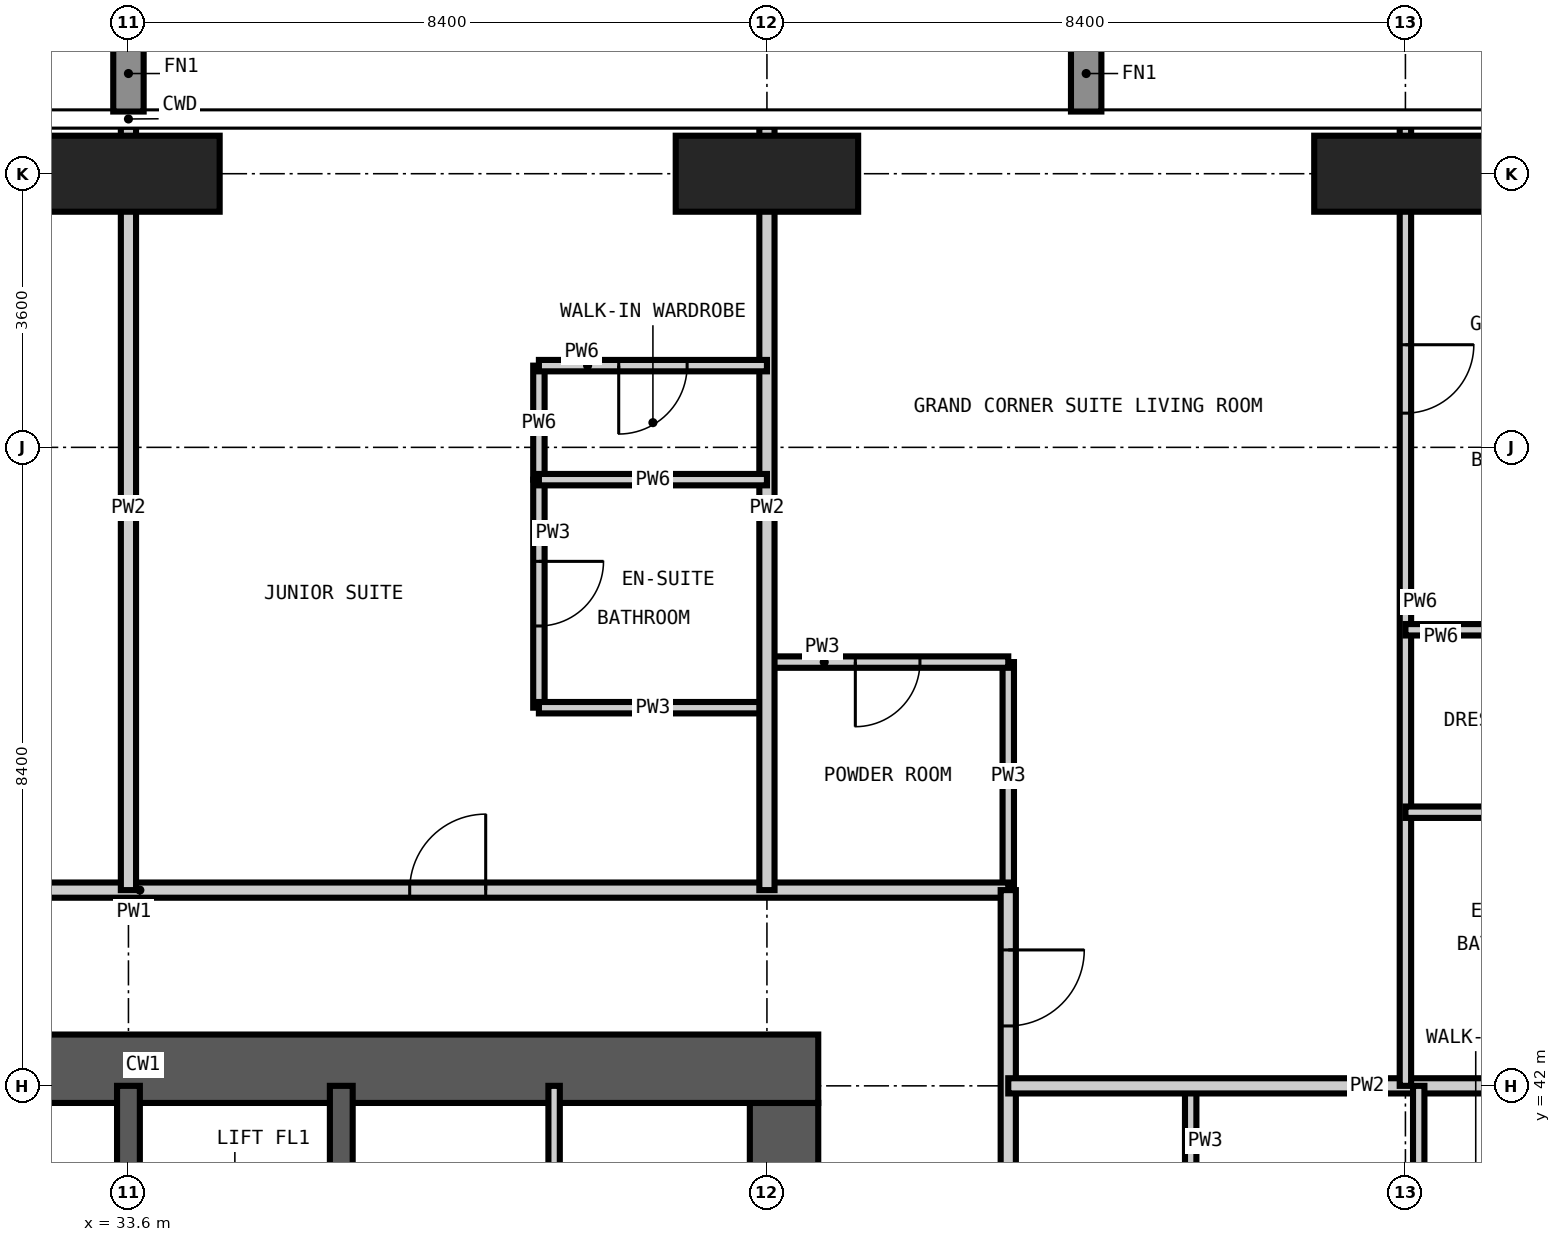
"""IFC4 building model, lengths in metres.
Left out: names, types, materials, properties, quantities, classifications, styles, units other than length and angle.
Written with IfcOpenShell. Run it as: python <this file> out.ifc"""

import sys

from ifc_helpers import new_model, si_unit, direction, frame, frame_2d, origin, origin_2d, place, context, subcontext, project, spatial, rectangle, extrude, element, fill, save


model = new_model("IFC4")
c1 = context("Model", 3, precision=1e-05, world=origin(), true_north=direction((0.0, 1.0)))
c2 = subcontext(c1, "Body", "Model", "MODEL_VIEW")
j1 = project(units=[si_unit("LENGTHUNIT", "METRE"), si_unit("PLANEANGLEUNIT", "RADIAN")], contexts=[c1])
p1 = place(None, origin())
s1 = spatial("IfcSite", under=j1, at=p1, CompositionType="ELEMENT")
p2 = place(p1, origin())
s2 = spatial("IfcBuilding", under=s1, at=p2, CompositionType="ELEMENT")
p3 = place(p2, frame((0.0, 0.0, 237.3)))
s3 = spatial("IfcBuildingStorey", under=s2, at=p3, CompositionType="ELEMENT", Elevation=237.3)
for number, where, z_axis, x_axis in (
    (1, (33.6, 54.0, -0.35), (0.0, 0.0, 1.0), (1.0, 0.0, 0.0)),
    (2, (42.0, 54.0, -0.35), (0.0, 0.0, 1.0), (1.0, 0.0, 0.0)),
    (3, (50.4, 54.0, -0.35), (0.0, 0.0, 1.0), (1.0, 0.0, 0.0)),
):
    element("IfcColumn", number, at=place(p3, frame(where, z_axis=z_axis, x_axis=x_axis)), inside=s3, PredefinedType="COLUMN", context=c2, shape_type="SweptSolid", body=[
        extrude(rectangle(XDim=2.4, YDim=1.0, at=origin_2d()), origin(), (0.0, 0.0, 1.0), 3.9),
    ])
p4 = place(p3, frame((42.225, 17.025, -0.35), z_axis=(0.0, 0.0, 1.0), x_axis=(0.0, 1.0, 0.0)))
e4 = element("IfcWall", 4, at=p4, inside=s3, PredefinedType="SHEAR", context=c2, shape_type="SweptSolid", body=[
    extrude(rectangle(XDim=24.75, YDim=0.9, at=frame_2d((12.375, 0.0))), origin(), (0.0, 0.0, 1.0), 3.9),
])
p5 = place(p4, frame((0.575, 0.0, 0.35)))
e5 = element("IfcOpeningElement", 5, at=p5, cuts=e4, PredefinedType="OPENING", context=c2, shape_type="SweptSolid", body=[
    extrude(rectangle(XDim=1.2, YDim=2.2, at=frame_2d((0.6, 1.1))), frame((0.0, 0.46, 0.0), z_axis=(0.0, -1.0, 0.0), x_axis=(1.0, 0.0, 0.0)), (0.0, 0.0, 1.0), 0.92),
])
p6 = place(p4, frame((11.475, 0.0, 0.35)))
e6 = element("IfcOpeningElement", 6, at=p6, cuts=e4, PredefinedType="OPENING", context=c2, shape_type="SweptSolid", body=[
    extrude(rectangle(XDim=1.8, YDim=2.2, at=frame_2d((0.9, 1.1))), frame((0.0, 0.46, 0.0), z_axis=(0.0, -1.0, 0.0), x_axis=(1.0, 0.0, 0.0)), (0.0, 0.0, 1.0), 0.92),
])
p7 = place(p4, frame((20.275, 0.0, 0.35)))
e7 = element("IfcOpeningElement", 7, at=p7, cuts=e4, PredefinedType="OPENING", context=c2, shape_type="SweptSolid", body=[
    extrude(rectangle(XDim=1.0, YDim=2.1, at=frame_2d((0.5, 1.05))), frame((0.0, 0.46, 0.0), z_axis=(0.0, -1.0, 0.0), x_axis=(1.0, 0.0, 0.0)), (0.0, 0.0, 1.0), 0.92),
])
p8 = place(p3, frame((42.675, 42.225, -0.35), z_axis=(0.0, 0.0, 1.0), x_axis=(-1.0, 0.0, 0.0)))
e8 = element("IfcWall", 8, at=p8, inside=s3, PredefinedType="SHEAR", context=c2, shape_type="SweptSolid", body=[
    extrude(rectangle(XDim=18.15, YDim=0.9, at=frame_2d((9.075, 0.0))), origin(), (0.0, 0.0, 1.0), 3.9),
])
p9 = place(p8, frame((10.575, 0.0, 0.35)))
e9 = element("IfcOpeningElement", 9, at=p9, cuts=e8, PredefinedType="OPENING", context=c2, shape_type="SweptSolid", body=[
    extrude(rectangle(XDim=1.2, YDim=2.2, at=frame_2d((0.6, 1.1))), frame((0.0, 0.46, 0.0), z_axis=(0.0, -1.0, 0.0), x_axis=(1.0, 0.0, 0.0)), (0.0, 0.0, 1.0), 0.92),
])
p10 = place(p3, frame((33.6, 16.8, -0.35), z_axis=(0.0, 0.0, 1.0), x_axis=(0.0, 1.0, 0.0)))
e10 = element("IfcWall", 10, at=p10, inside=s3, PredefinedType="SHEAR", context=c2, shape_type="SweptSolid", body=[
    extrude(rectangle(XDim=25.2, YDim=0.3, at=frame_2d((12.6, 0.0))), origin(), (0.0, 0.0, 1.0), 3.9),
])
p11 = place(p10, frame((22.5, 0.0, 0.35)))
e11 = element("IfcOpeningElement", 11, at=p11, cuts=e10, PredefinedType="OPENING", context=c2, shape_type="SweptSolid", body=[
    extrude(rectangle(XDim=1.2, YDim=2.2, at=frame_2d((0.6, 1.1))), frame((0.0, 0.16, 0.0), z_axis=(0.0, -1.0, 0.0), x_axis=(1.0, 0.0, 0.0)), (0.0, 0.0, 1.0), 0.32),
])
p12 = place(p10, frame((18.3, 0.0, 0.35)))
e12 = element("IfcOpeningElement", 12, at=p12, cuts=e10, PredefinedType="OPENING", context=c2, shape_type="SweptSolid", body=[
    extrude(rectangle(XDim=1.2, YDim=2.2, at=frame_2d((0.6, 1.1))), frame((0.0, 0.16, 0.0), z_axis=(0.0, -1.0, 0.0), x_axis=(1.0, 0.0, 0.0)), (0.0, 0.0, 1.0), 0.32),
])
p13 = place(p10, frame((9.3, 0.0, 0.35)))
e13 = element("IfcOpeningElement", 13, at=p13, cuts=e10, PredefinedType="OPENING", context=c2, shape_type="SweptSolid", body=[
    extrude(rectangle(XDim=1.0, YDim=2.1, at=frame_2d((0.5, 1.05))), frame((0.0, 0.16, 0.0), z_axis=(0.0, -1.0, 0.0), x_axis=(1.0, 0.0, 0.0)), (0.0, 0.0, 1.0), 0.32),
])
p14 = place(p3, frame((36.4, 33.6, -0.35), z_axis=(0.0, 0.0, 1.0), x_axis=(0.0, 1.0, 0.0)))
e14 = element("IfcWall", 14, at=p14, inside=s3, PredefinedType="SHEAR", context=c2, shape_type="SweptSolid", body=[
    extrude(rectangle(XDim=8.4, YDim=0.3, at=frame_2d((4.2, 0.0))), origin(), (0.0, 0.0, 1.0), 3.9),
])
p15 = place(p3, frame((39.0, 46.975, 0.0), z_axis=(0.0, 0.0, 1.0), x_axis=(0.0, 1.0, 0.0)))
e15 = element("IfcWall", 15, at=p15, inside=s3, PredefinedType="PARTITIONING", context=c2, shape_type="SweptSolid", body=[
    extrude(rectangle(XDim=3.0, YDim=0.15, at=frame_2d((1.5, 0.0))), origin(), (0.0, 0.0, 1.0), 3.55),
])
p16 = place(p15, frame((1.075, 0.0, 0.0)))
e16 = element("IfcOpeningElement", 16, at=p16, cuts=e15, PredefinedType="OPENING", context=c2, shape_type="SweptSolid", body=[
    extrude(rectangle(XDim=0.85, YDim=2.1, at=frame_2d((0.425, 1.05))), frame((0.0, 0.085, 0.0), z_axis=(0.0, -1.0, 0.0), x_axis=(1.0, 0.0, 0.0)), (0.0, 0.0, 1.0), 0.17),
])
p17 = place(p3, frame((45.175, 44.575, 0.0), z_axis=(0.0, 0.0, 1.0), x_axis=(0.0, 1.0, 0.0)))
e17 = element("IfcWall", 17, at=p17, inside=s3, PredefinedType="PARTITIONING", context=c2, shape_type="SweptSolid", body=[
    extrude(rectangle(XDim=3.0, YDim=0.15, at=frame_2d((1.5, 0.0))), origin(), (0.0, 0.0, 1.0), 3.55),
])
p18 = place(p3, frame((47.575, 39.0, 0.0), z_axis=(0.0, 0.0, 1.0), x_axis=(0.0, 1.0, 0.0)))
e18 = element("IfcWall", 18, at=p18, inside=s3, PredefinedType="PARTITIONING", context=c2, shape_type="SweptSolid", body=[
    extrude(rectangle(XDim=3.0, YDim=0.15, at=frame_2d((1.5, 0.0))), origin(), (0.0, 0.0, 1.0), 3.55),
])
p19 = place(p18, frame((1.075, 0.0, 0.0)))
e19 = element("IfcOpeningElement", 19, at=p19, cuts=e18, PredefinedType="OPENING", context=c2, shape_type="SweptSolid", body=[
    extrude(rectangle(XDim=0.85, YDim=2.1, at=frame_2d((0.425, 1.05))), frame((0.0, 0.085, 0.0), z_axis=(0.0, -1.0, 0.0), x_axis=(1.0, 0.0, 0.0)), (0.0, 0.0, 1.0), 0.17),
])
p20 = place(p3, frame((39.0, 46.975, 0.0), z_axis=(0.0, 0.0, 1.0), x_axis=(1.0, 0.0, 0.0)))
e20 = element("IfcWall", 20, at=p20, inside=s3, PredefinedType="PARTITIONING", context=c2, shape_type="SweptSolid", body=[
    extrude(rectangle(XDim=3.0, YDim=0.15, at=frame_2d((1.5, 0.0))), origin(), (0.0, 0.0, 1.0), 3.55),
])
p21 = place(p3, frame((42.0, 47.575, 0.0), z_axis=(0.0, 0.0, 1.0), x_axis=(1.0, 0.0, 0.0)))
e21 = element("IfcWall", 21, at=p21, inside=s3, PredefinedType="PARTITIONING", context=c2, shape_type="SweptSolid", body=[
    extrude(rectangle(XDim=3.175, YDim=0.15, at=frame_2d((1.587, 0.0))), origin(), (0.0, 0.0, 1.0), 3.55),
])
p22 = place(p21, frame((1.163, 0.0, 0.0)))
e22 = element("IfcOpeningElement", 22, at=p22, cuts=e21, PredefinedType="OPENING", context=c2, shape_type="SweptSolid", body=[
    extrude(rectangle(XDim=0.85, YDim=2.1, at=frame_2d((0.425, 1.05))), frame((0.0, 0.085, 0.0), z_axis=(0.0, -1.0, 0.0), x_axis=(1.0, 0.0, 0.0)), (0.0, 0.0, 1.0), 0.17),
])
p23 = place(p3, frame((22.325, 44.575, 0.0), z_axis=(0.0, 0.0, 1.0), x_axis=(1.0, 0.0, 0.0)))
e23 = element("IfcWall", 23, at=p23, inside=s3, PredefinedType="PARTITIONING", context=c2, shape_type="SweptSolid", body=[
    extrude(rectangle(XDim=22.85, YDim=0.2, at=frame_2d((11.425, 0.0))), origin(), (0.0, 0.0, 1.0), 3.55),
])
p24 = place(p23, frame((6.575, 0.0, 0.0)))
e24 = element("IfcOpeningElement", 24, at=p24, cuts=e23, PredefinedType="OPENING", context=c2, shape_type="SweptSolid", body=[
    extrude(rectangle(XDim=1.0, YDim=2.2, at=frame_2d((0.5, 1.1))), frame((0.0, 0.11, 0.0), z_axis=(0.0, -1.0, 0.0), x_axis=(1.0, 0.0, 0.0)), (0.0, 0.0, 1.0), 0.22),
])
p25 = place(p23, frame((14.975, 0.0, 0.0)))
e25 = element("IfcOpeningElement", 25, at=p25, cuts=e23, PredefinedType="OPENING", context=c2, shape_type="SweptSolid", body=[
    extrude(rectangle(XDim=1.0, YDim=2.2, at=frame_2d((0.5, 1.1))), frame((0.0, 0.11, 0.0), z_axis=(0.0, -1.0, 0.0), x_axis=(1.0, 0.0, 0.0)), (0.0, 0.0, 1.0), 0.22),
])
p26 = place(p3, frame((45.175, 44.575, 0.0), z_axis=(0.0, 0.0, 1.0), x_axis=(0.0, -1.0, 0.0)))
e26 = element("IfcWall", 26, at=p26, inside=s3, PredefinedType="PARTITIONING", context=c2, shape_type="SweptSolid", body=[
    extrude(rectangle(XDim=10.975, YDim=0.2, at=frame_2d((5.487, 0.0))), origin(), (0.0, 0.0, 1.0), 3.55),
])
p27 = place(p26, frame((7.475, 0.0, 0.0)))
e27 = element("IfcOpeningElement", 27, at=p27, cuts=e26, PredefinedType="OPENING", context=c2, shape_type="SweptSolid", body=[
    extrude(rectangle(XDim=1.0, YDim=2.2, at=frame_2d((0.5, 1.1))), frame((0.0, 0.11, 0.0), z_axis=(0.0, -1.0, 0.0), x_axis=(1.0, 0.0, 0.0)), (0.0, 0.0, 1.0), 0.22),
])
p28 = place(p26, frame((0.787, 0.0, 0.0)))
e28 = element("IfcOpeningElement", 28, at=p28, cuts=e26, PredefinedType="OPENING", context=c2, shape_type="SweptSolid", body=[
    extrude(rectangle(XDim=1.0, YDim=2.2, at=frame_2d((0.5, 1.1))), frame((0.0, 0.11, 0.0), z_axis=(0.0, -1.0, 0.0), x_axis=(1.0, 0.0, 0.0)), (0.0, 0.0, 1.0), 0.22),
])
for number, where, z_axis, x_axis in (
    (29, (33.6, 44.575, 0.0), (0.0, 0.0, 1.0), (0.0, 1.0, 0.0)),
    (30, (42.0, 44.575, 0.0), (0.0, 0.0, 1.0), (0.0, 1.0, 0.0)),
):
    element("IfcWall", number, at=place(p3, frame(where, z_axis=z_axis, x_axis=x_axis)), inside=s3, PredefinedType="PARTITIONING", context=c2, shape_type="SweptSolid", body=[
        extrude(rectangle(XDim=10.043, YDim=0.2, at=frame_2d((5.021, 0.0))), origin(), (0.0, 0.0, 1.0), 3.55),
    ])
p29 = place(p3, frame((45.175, 42.0, 0.0), z_axis=(0.0, 0.0, 1.0), x_axis=(1.0, 0.0, 0.0)))
e31 = element("IfcWall", 31, at=p29, inside=s3, PredefinedType="PARTITIONING", context=c2, shape_type="SweptSolid", body=[
    extrude(rectangle(XDim=9.443, YDim=0.2, at=frame_2d((4.721, 0.0))), origin(), (0.0, 0.0, 1.0), 3.55),
])
p30 = place(p3, frame((39.0, 49.975, 0.0), z_axis=(0.0, 0.0, 1.0), x_axis=(0.0, 1.0, 0.0)))
e32 = element("IfcWall", 32, at=p30, inside=s3, PredefinedType="PARTITIONING", context=c2, shape_type="SweptSolid", body=[
    extrude(rectangle(XDim=1.5, YDim=0.15, at=frame_2d((0.75, 0.0))), origin(), (0.0, 0.0, 1.0), 3.55),
])
p31 = place(p3, frame((39.2, 33.6, 0.0), z_axis=(0.0, 0.0, 1.0), x_axis=(0.0, 1.0, 0.0)))
e33 = element("IfcWall", 33, at=p31, inside=s3, PredefinedType="PARTITIONING", context=c2, shape_type="SweptSolid", body=[
    extrude(rectangle(XDim=8.4, YDim=0.15, at=frame_2d((4.2, 0.0))), origin(), (0.0, 0.0, 1.0), 3.55),
])
p32 = place(p31, frame((3.7, 0.0, 0.0)))
e34 = element("IfcOpeningElement", 34, at=p32, cuts=e33, PredefinedType="OPENING", context=c2, shape_type="SweptSolid", body=[
    extrude(rectangle(XDim=1.0, YDim=2.1, at=frame_2d((0.5, 1.05))), frame((0.0, 0.085, 0.0), z_axis=(0.0, -1.0, 0.0), x_axis=(1.0, 0.0, 0.0)), (0.0, 0.0, 1.0), 0.17),
])
p33 = place(p3, frame((50.4, 42.0, 0.0), z_axis=(0.0, 0.0, 1.0), x_axis=(0.0, 1.0, 0.0)))
e35 = element("IfcWall", 35, at=p33, inside=s3, PredefinedType="PARTITIONING", context=c2, shape_type="SweptSolid", body=[
    extrude(rectangle(XDim=12.618, YDim=0.15, at=frame_2d((6.309, 0.0))), origin(), (0.0, 0.0, 1.0), 3.55),
])
p34 = place(p33, frame((8.85, 0.0, 0.0)))
e36 = element("IfcOpeningElement", 36, at=p34, cuts=e35, PredefinedType="OPENING", context=c2, shape_type="SweptSolid", body=[
    extrude(rectangle(XDim=0.9, YDim=2.1, at=frame_2d((0.45, 1.05))), frame((0.0, 0.085, 0.0), z_axis=(0.0, -1.0, 0.0), x_axis=(1.0, 0.0, 0.0)), (0.0, 0.0, 1.0), 0.17),
])
for number, where, z_axis, x_axis in (
    (37, (50.575, 39.0, 0.0), (0.0, 0.0, 1.0), (0.0, 1.0, 0.0)),
    (38, (50.4, 45.6, 0.0), (0.0, 0.0, 1.0), (1.0, 0.0, 0.0)),
):
    element("IfcWall", number, at=place(p3, frame(where, z_axis=z_axis, x_axis=x_axis)), inside=s3, PredefinedType="PARTITIONING", context=c2, shape_type="SweptSolid", body=[
        extrude(rectangle(XDim=3.0, YDim=0.15, at=frame_2d((1.5, 0.0))), origin(), (0.0, 0.0, 1.0), 3.55),
    ])
p35 = place(p3, frame((50.4, 48.0, 0.0), z_axis=(0.0, 0.0, 1.0), x_axis=(1.0, 0.0, 0.0)))
e39 = element("IfcWall", 39, at=p35, inside=s3, PredefinedType="PARTITIONING", context=c2, shape_type="SweptSolid", body=[
    extrude(rectangle(XDim=3.0, YDim=0.15, at=frame_2d((1.5, 0.0))), origin(), (0.0, 0.0, 1.0), 3.55),
])
p36 = place(p35, frame((1.05, 0.0, 0.0)))
e40 = element("IfcOpeningElement", 40, at=p36, cuts=e39, PredefinedType="OPENING", context=c2, shape_type="SweptSolid", body=[
    extrude(rectangle(XDim=0.9, YDim=2.1, at=frame_2d((0.45, 1.05))), frame((0.0, 0.085, 0.0), z_axis=(0.0, -1.0, 0.0), x_axis=(1.0, 0.0, 0.0)), (0.0, 0.0, 1.0), 0.17),
])
p37 = place(p3, frame((39.0, 49.975, 0.0), z_axis=(0.0, 0.0, 1.0), x_axis=(1.0, 0.0, 0.0)))
e41 = element("IfcWall", 41, at=p37, inside=s3, PredefinedType="PARTITIONING", context=c2, shape_type="SweptSolid", body=[
    extrude(rectangle(XDim=3.0, YDim=0.15, at=frame_2d((1.5, 0.0))), origin(), (0.0, 0.0, 1.0), 3.55),
])
p38 = place(p3, frame((39.0, 51.475, 0.0), z_axis=(0.0, 0.0, 1.0), x_axis=(1.0, 0.0, 0.0)))
e42 = element("IfcWall", 42, at=p38, inside=s3, PredefinedType="PARTITIONING", context=c2, shape_type="SweptSolid", body=[
    extrude(rectangle(XDim=3.0, YDim=0.15, at=frame_2d((1.5, 0.0))), origin(), (0.0, 0.0, 1.0), 3.55),
])
p39 = place(p38, frame((1.05, 0.0, 0.0)))
e43 = element("IfcOpeningElement", 43, at=p39, cuts=e42, PredefinedType="OPENING", context=c2, shape_type="SweptSolid", body=[
    extrude(rectangle(XDim=0.9, YDim=2.1, at=frame_2d((0.45, 1.05))), frame((0.0, 0.085, 0.0), z_axis=(0.0, -1.0, 0.0), x_axis=(1.0, 0.0, 0.0)), (0.0, 0.0, 1.0), 0.17),
])
p40 = place(p25, origin())
e44 = element("IfcDoor", 44, at=p40, inside=s3, OperationType="SINGLE_SWING_RIGHT", PredefinedType="DOOR", context=c2, shape_type="SweptSolid", body=[
    extrude(rectangle(XDim=1.0, YDim=2.2, at=frame_2d((0.5, 1.1))), frame((0.0, 0.025, 0.0), z_axis=(0.0, -1.0, 0.0), x_axis=(1.0, 0.0, 0.0)), (0.0, 0.0, 1.0), 0.05),
])
fill(e25, e44)
p41 = place(p16, frame((0.85, 0.0, 0.0), z_axis=(0.0, 0.0, 1.0), x_axis=(-1.0, 0.0, 0.0)))
e45 = element("IfcDoor", 45, at=p41, inside=s3, OperationType="SINGLE_SWING_LEFT", PredefinedType="DOOR", context=c2, shape_type="SweptSolid", body=[
    extrude(rectangle(XDim=0.85, YDim=2.1, at=frame_2d((0.425, 1.05))), frame((0.0, 0.025, 0.0), z_axis=(0.0, -1.0, 0.0), x_axis=(1.0, 0.0, 0.0)), (0.0, 0.0, 1.0), 0.05),
])
fill(e16, e45)
p42 = place(p39, frame((0.9, 0.0, 0.0), z_axis=(0.0, 0.0, 1.0), x_axis=(-1.0, 0.0, 0.0)))
e46 = element("IfcDoor", 46, at=p42, inside=s3, OperationType="SINGLE_SWING_RIGHT", PredefinedType="DOOR", context=c2, shape_type="SweptSolid", body=[
    extrude(rectangle(XDim=0.9, YDim=2.1, at=frame_2d((0.45, 1.05))), frame((0.0, 0.025, 0.0), z_axis=(0.0, -1.0, 0.0), x_axis=(1.0, 0.0, 0.0)), (0.0, 0.0, 1.0), 0.05),
])
fill(e43, e46)
p43 = place(p28, origin())
e47 = element("IfcDoor", 47, at=p43, inside=s3, OperationType="SINGLE_SWING_LEFT", PredefinedType="DOOR", context=c2, shape_type="SweptSolid", body=[
    extrude(rectangle(XDim=1.0, YDim=2.2, at=frame_2d((0.5, 1.1))), frame((0.0, 0.025, 0.0), z_axis=(0.0, -1.0, 0.0), x_axis=(1.0, 0.0, 0.0)), (0.0, 0.0, 1.0), 0.05),
])
fill(e28, e47)
p44 = place(p22, frame((0.85, 0.0, 0.0), z_axis=(0.0, 0.0, 1.0), x_axis=(-1.0, 0.0, 0.0)))
e48 = element("IfcDoor", 48, at=p44, inside=s3, OperationType="SINGLE_SWING_RIGHT", PredefinedType="DOOR", context=c2, shape_type="SweptSolid", body=[
    extrude(rectangle(XDim=0.85, YDim=2.1, at=frame_2d((0.425, 1.05))), frame((0.0, 0.025, 0.0), z_axis=(0.0, -1.0, 0.0), x_axis=(1.0, 0.0, 0.0)), (0.0, 0.0, 1.0), 0.05),
])
fill(e22, e48)
p45 = place(p34, frame((0.9, 0.0, 0.0), z_axis=(0.0, 0.0, 1.0), x_axis=(-1.0, 0.0, 0.0)))
e49 = element("IfcDoor", 49, at=p45, inside=s3, OperationType="SINGLE_SWING_LEFT", PredefinedType="DOOR", context=c2, shape_type="SweptSolid", body=[
    extrude(rectangle(XDim=0.9, YDim=2.1, at=frame_2d((0.45, 1.05))), frame((0.0, 0.025, 0.0), z_axis=(0.0, -1.0, 0.0), x_axis=(1.0, 0.0, 0.0)), (0.0, 0.0, 1.0), 0.05),
])
fill(e36, e49)
save(model, sys.argv[1])
